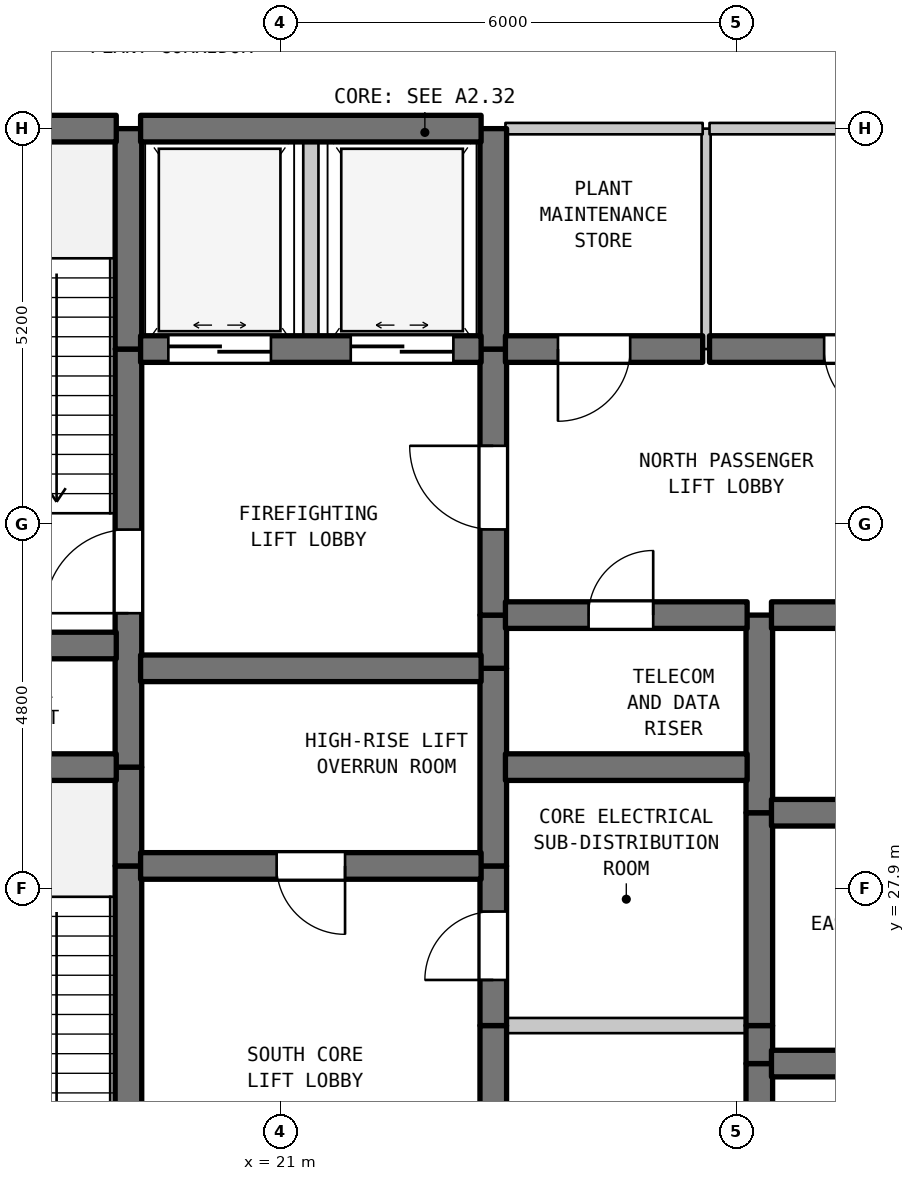
"""IFC4 building model, lengths in metres.
Left out: names, types, materials, properties, quantities, classifications, styles, units other than length and angle.
Written with IfcOpenShell. Run it as: python <this file> out.ifc"""

import sys

from ifc_helpers import new_model, si_unit, direction, frame, frame_2d, origin, place, context, subcontext, project, spatial, rectangle, extrude, element, fill, save


model = new_model("IFC4")
c1 = context("Model", 3, precision=1e-05, world=origin(), true_north=direction((0.0, 1.0)))
c2 = subcontext(c1, "Body", "Model", "MODEL_VIEW")
j1 = project(units=[si_unit("LENGTHUNIT", "METRE"), si_unit("PLANEANGLEUNIT", "RADIAN")], contexts=[c1])
p1 = place(None, origin())
s1 = spatial("IfcSite", under=j1, at=p1, CompositionType="ELEMENT")
p2 = place(p1, origin())
s2 = spatial("IfcBuilding", under=s1, at=p2, CompositionType="ELEMENT")
p3 = place(p2, frame((0.0, 0.0, 314.7)))
s3 = spatial("IfcBuildingStorey", under=s2, at=p3, CompositionType="ELEMENT", Elevation=314.7)
p4 = place(p3, frame((19.0, 22.7, 0.0), z_axis=(0.0, 0.0, 1.0), x_axis=(0.0, 1.0, 0.0)))
e1 = element("IfcWall", 1, at=p4, inside=s3, PredefinedType="SHEAR", context=c2, shape_type="SweptSolid", body=[
    extrude(rectangle(XDim=5.5, YDim=0.35, at=frame_2d((2.75, 0.0))), origin(), (0.0, 0.0, 1.0), 4.99),
])
p5 = place(p4, frame((0.631, 0.0, 0.0)))
e2 = element("IfcOpeningElement", 2, at=p5, cuts=e1, PredefinedType="OPENING", context=c2, shape_type="SweptSolid", body=[
    extrude(rectangle(XDim=1.1, YDim=2.15, at=frame_2d((0.55, 1.075))), frame((0.0, 0.185, 0.0), z_axis=(0.0, -1.0, 0.0), x_axis=(1.0, 0.0, 0.0)), (0.0, 0.0, 1.0), 0.37),
])
p6 = place(p3, frame((19.0, 28.2, 0.0), z_axis=(0.0, 0.0, 1.0), x_axis=(0.0, 1.0, 0.0)))
e3 = element("IfcWall", 3, at=p6, inside=s3, PredefinedType="SHEAR", context=c2, shape_type="SweptSolid", body=[
    extrude(rectangle(XDim=1.3, YDim=0.35, at=frame_2d((0.65, 0.0))), origin(), (0.0, 0.0, 1.0), 4.99),
])
p7 = place(p3, frame((19.0, 29.5, 0.0), z_axis=(0.0, 0.0, 1.0), x_axis=(0.0, 1.0, 0.0)))
e4 = element("IfcWall", 4, at=p7, inside=s3, PredefinedType="SHEAR", context=c2, shape_type="SweptSolid", body=[
    extrude(rectangle(XDim=5.5, YDim=0.35, at=frame_2d((2.75, 0.0))), origin(), (0.0, 0.0, 1.0), 4.99),
])
p8 = place(p7, frame((2.025, 0.0, 0.0)))
e5 = element("IfcOpeningElement", 5, at=p8, cuts=e4, PredefinedType="OPENING", context=c2, shape_type="SweptSolid", body=[
    extrude(rectangle(XDim=1.1, YDim=2.15, at=frame_2d((0.55, 1.075))), frame((0.0, 0.185, 0.0), z_axis=(0.0, -1.0, 0.0), x_axis=(1.0, 0.0, 0.0)), (0.0, 0.0, 1.0), 0.37),
])
p9 = place(p3, frame((19.0, 35.0, 0.0), z_axis=(0.0, 0.0, 1.0), x_axis=(0.0, 1.0, 0.0)))
e6 = element("IfcWall", 6, at=p9, inside=s3, PredefinedType="SHEAR", context=c2, shape_type="SweptSolid", body=[
    extrude(rectangle(XDim=2.9, YDim=0.35, at=frame_2d((1.45, 0.0))), origin(), (0.0, 0.0, 1.0), 4.99),
])
p10 = place(p3, frame((21.4, 35.0, 0.0), z_axis=(0.0, 0.0, 1.0), x_axis=(0.0, 1.0, 0.0)))
e7 = element("IfcWall", 7, at=p10, inside=s3, PredefinedType="STANDARD", context=c2, shape_type="SweptSolid", body=[
    extrude(rectangle(XDim=2.9, YDim=0.2, at=frame_2d((1.45, 0.0))), origin(), (0.0, 0.0, 1.0), 4.99),
])
p11 = place(p3, frame((23.8, 22.7, 0.0), z_axis=(0.0, 0.0, 1.0), x_axis=(0.0, 1.0, 0.0)))
e8 = element("IfcWall", 8, at=p11, inside=s3, PredefinedType="SHEAR", context=c2, shape_type="SweptSolid", body=[
    extrude(rectangle(XDim=3.4, YDim=0.35, at=frame_2d((1.7, 0.0))), origin(), (0.0, 0.0, 1.0), 4.99),
])
p12 = place(p11, frame((1.25, 0.0, 0.0)))
e9 = element("IfcOpeningElement", 9, at=p12, cuts=e8, PredefinedType="OPENING", context=c2, shape_type="SweptSolid", body=[
    extrude(rectangle(XDim=0.9, YDim=2.15, at=frame_2d((0.45, 1.075))), frame((0.0, 0.185, 0.0), z_axis=(0.0, -1.0, 0.0), x_axis=(1.0, 0.0, 0.0)), (0.0, 0.0, 1.0), 0.37),
])
p13 = place(p3, frame((23.8, 26.1, 0.0), z_axis=(0.0, 0.0, 1.0), x_axis=(0.0, 1.0, 0.0)))
e10 = element("IfcWall", 10, at=p13, inside=s3, PredefinedType="SHEAR", context=c2, shape_type="SweptSolid", body=[
    extrude(rectangle(XDim=2.1, YDim=0.35, at=frame_2d((1.05, 0.0))), origin(), (0.0, 0.0, 1.0), 4.99),
])
p14 = place(p13, frame((0.6, 0.0, 0.0)))
e11 = element("IfcOpeningElement", 11, at=p14, cuts=e10, PredefinedType="OPENING", context=c2, shape_type="SweptSolid", body=[
    extrude(rectangle(XDim=0.9, YDim=2.15, at=frame_2d((0.45, 1.075))), frame((0.0, 0.185, 0.0), z_axis=(0.0, -1.0, 0.0), x_axis=(1.0, 0.0, 0.0)), (0.0, 0.0, 1.0), 0.37),
])
p15 = place(p3, frame((23.8, 28.2, 0.0), z_axis=(0.0, 0.0, 1.0), x_axis=(0.0, 1.0, 0.0)))
e12 = element("IfcWall", 12, at=p15, inside=s3, PredefinedType="SHEAR", context=c2, shape_type="SweptSolid", body=[
    extrude(rectangle(XDim=2.6, YDim=0.35, at=frame_2d((1.3, 0.0))), origin(), (0.0, 0.0, 1.0), 4.99),
])
p16 = place(p3, frame((23.8, 30.8, 0.0), z_axis=(0.0, 0.0, 1.0), x_axis=(0.0, 1.0, 0.0)))
e13 = element("IfcWall", 13, at=p16, inside=s3, PredefinedType="SHEAR", context=c2, shape_type="SweptSolid", body=[
    extrude(rectangle(XDim=0.7, YDim=0.35, at=frame_2d((0.35, 0.0))), origin(), (0.0, 0.0, 1.0), 4.99),
])
p17 = place(p3, frame((23.8, 31.5, 0.0), z_axis=(0.0, 0.0, 1.0), x_axis=(0.0, 1.0, 0.0)))
e14 = element("IfcWall", 14, at=p17, inside=s3, PredefinedType="SHEAR", context=c2, shape_type="SweptSolid", body=[
    extrude(rectangle(XDim=3.5, YDim=0.35, at=frame_2d((1.75, 0.0))), origin(), (0.0, 0.0, 1.0), 4.99),
])
p18 = place(p17, frame((1.127, 0.0, 0.0)))
e15 = element("IfcOpeningElement", 15, at=p18, cuts=e14, PredefinedType="OPENING", context=c2, shape_type="SweptSolid", body=[
    extrude(rectangle(XDim=1.1, YDim=2.15, at=frame_2d((0.55, 1.075))), frame((0.0, 0.185, 0.0), z_axis=(0.0, -1.0, 0.0), x_axis=(1.0, 0.0, 0.0)), (0.0, 0.0, 1.0), 0.37),
])
p19 = place(p3, frame((23.8, 35.0, 0.0), z_axis=(0.0, 0.0, 1.0), x_axis=(0.0, 1.0, 0.0)))
e16 = element("IfcWall", 16, at=p19, inside=s3, PredefinedType="SHEAR", context=c2, shape_type="SweptSolid", body=[
    extrude(rectangle(XDim=2.9, YDim=0.35, at=frame_2d((1.45, 0.0))), origin(), (0.0, 0.0, 1.0), 4.99),
])
p20 = place(p3, frame((26.6, 35.0, 0.0), z_axis=(0.0, 0.0, 1.0), x_axis=(0.0, 1.0, 0.0)))
e17 = element("IfcWall", 17, at=p20, inside=s3, PredefinedType="PARTITIONING", context=c2, shape_type="SweptSolid", body=[
    extrude(rectangle(XDim=2.9, YDim=0.12, at=frame_2d((1.45, 0.0))), origin(), (0.0, 0.0, 1.0), 4.99),
])
p21 = place(p3, frame((27.3, 22.7, 0.0), z_axis=(0.0, 0.0, 1.0), x_axis=(0.0, 1.0, 0.0)))
e18 = element("IfcWall", 18, at=p21, inside=s3, PredefinedType="SHEAR", context=c2, shape_type="SweptSolid", body=[
    extrude(rectangle(XDim=2.9, YDim=0.35, at=frame_2d((1.45, 0.0))), origin(), (0.0, 0.0, 1.0), 4.99),
])
p22 = place(p3, frame((27.3, 25.6, 0.0), z_axis=(0.0, 0.0, 1.0), x_axis=(0.0, 1.0, 0.0)))
e19 = element("IfcWall", 19, at=p22, inside=s3, PredefinedType="SHEAR", context=c2, shape_type="SweptSolid", body=[
    extrude(rectangle(XDim=0.5, YDim=0.35, at=frame_2d((0.25, 0.0))), origin(), (0.0, 0.0, 1.0), 4.99),
])
p23 = place(p3, frame((27.3, 26.1, 0.0), z_axis=(0.0, 0.0, 1.0), x_axis=(0.0, 1.0, 0.0)))
e20 = element("IfcWall", 20, at=p23, inside=s3, PredefinedType="SHEAR", context=c2, shape_type="SweptSolid", body=[
    extrude(rectangle(XDim=2.8, YDim=0.35, at=frame_2d((1.4, 0.0))), origin(), (0.0, 0.0, 1.0), 4.99),
])
p24 = place(p3, frame((27.3, 28.9, 0.0), z_axis=(0.0, 0.0, 1.0), x_axis=(0.0, 1.0, 0.0)))
e21 = element("IfcWall", 21, at=p24, inside=s3, PredefinedType="SHEAR", context=c2, shape_type="SweptSolid", body=[
    extrude(rectangle(XDim=2.6, YDim=0.35, at=frame_2d((1.3, 0.0))), origin(), (0.0, 0.0, 1.0), 4.99),
])
p25 = place(p3, frame((27.46, 25.6, 0.0), z_axis=(0.0, 0.0, 1.0), x_axis=(1.0, 0.0, 0.0)))
e22 = element("IfcWall", 22, at=p25, inside=s3, PredefinedType="SHEAR", context=c2, shape_type="SweptSolid", body=[
    extrude(rectangle(XDim=3.18, YDim=0.35, at=frame_2d((1.59, 0.0))), origin(), (0.0, 0.0, 1.0), 4.99),
])
p26 = place(p25, frame((1.115, 0.0, 0.0)))
e23 = element("IfcOpeningElement", 23, at=p26, cuts=e22, PredefinedType="OPENING", context=c2, shape_type="SweptSolid", body=[
    extrude(rectangle(XDim=0.95, YDim=2.15, at=frame_2d((0.475, 1.075))), frame((0.0, 0.185, 0.0), z_axis=(0.0, -1.0, 0.0), x_axis=(1.0, 0.0, 0.0)), (0.0, 0.0, 1.0), 0.37),
])
p27 = place(p3, frame((23.96, 26.1, 0.0), z_axis=(0.0, 0.0, 1.0), x_axis=(1.0, 0.0, 0.0)))
e24 = element("IfcWall", 24, at=p27, inside=s3, PredefinedType="STANDARD", context=c2, shape_type="SweptSolid", body=[
    extrude(rectangle(XDim=3.18, YDim=0.2, at=frame_2d((1.59, 0.0))), origin(), (0.0, 0.0, 1.0), 4.99),
])
p28 = place(p3, frame((19.16, 28.2, 0.0), z_axis=(0.0, 0.0, 1.0), x_axis=(1.0, 0.0, 0.0)))
e25 = element("IfcWall", 25, at=p28, inside=s3, PredefinedType="SHEAR", context=c2, shape_type="SweptSolid", body=[
    extrude(rectangle(XDim=4.48, YDim=0.35, at=frame_2d((2.24, 0.0))), origin(), (0.0, 0.0, 1.0), 4.99),
])
p29 = place(p28, frame((1.79, 0.0, 0.0)))
e26 = element("IfcOpeningElement", 26, at=p29, cuts=e25, PredefinedType="OPENING", context=c2, shape_type="SweptSolid", body=[
    extrude(rectangle(XDim=0.9, YDim=2.15, at=frame_2d((0.45, 1.075))), frame((0.0, 0.185, 0.0), z_axis=(0.0, -1.0, 0.0), x_axis=(1.0, 0.0, 0.0)), (0.0, 0.0, 1.0), 0.37),
])
p30 = place(p3, frame((27.46, 28.9, 0.0), z_axis=(0.0, 0.0, 1.0), x_axis=(1.0, 0.0, 0.0)))
e27 = element("IfcWall", 27, at=p30, inside=s3, PredefinedType="SHEAR", context=c2, shape_type="SweptSolid", body=[
    extrude(rectangle(XDim=3.18, YDim=0.35, at=frame_2d((1.59, 0.0))), origin(), (0.0, 0.0, 1.0), 4.99),
])
p31 = place(p30, frame((1.115, 0.0, 0.0)))
e28 = element("IfcOpeningElement", 28, at=p31, cuts=e27, PredefinedType="OPENING", context=c2, shape_type="SweptSolid", body=[
    extrude(rectangle(XDim=0.95, YDim=2.15, at=frame_2d((0.475, 1.075))), frame((0.0, 0.185, 0.0), z_axis=(0.0, -1.0, 0.0), x_axis=(1.0, 0.0, 0.0)), (0.0, 0.0, 1.0), 0.37),
])
p32 = place(p3, frame((15.16, 29.5, 0.0), z_axis=(0.0, 0.0, 1.0), x_axis=(1.0, 0.0, 0.0)))
e29 = element("IfcWall", 29, at=p32, inside=s3, PredefinedType="SHEAR", context=c2, shape_type="SweptSolid", body=[
    extrude(rectangle(XDim=3.68, YDim=0.35, at=frame_2d((1.84, 0.0))), origin(), (0.0, 0.0, 1.0), 4.99),
])
p33 = place(p3, frame((23.96, 29.5, 0.0), z_axis=(0.0, 0.0, 1.0), x_axis=(1.0, 0.0, 0.0)))
e30 = element("IfcWall", 30, at=p33, inside=s3, PredefinedType="SHEAR", context=c2, shape_type="SweptSolid", body=[
    extrude(rectangle(XDim=3.18, YDim=0.35, at=frame_2d((1.59, 0.0))), origin(), (0.0, 0.0, 1.0), 4.99),
])
p34 = place(p3, frame((19.16, 30.8, 0.0), z_axis=(0.0, 0.0, 1.0), x_axis=(1.0, 0.0, 0.0)))
e31 = element("IfcWall", 31, at=p34, inside=s3, PredefinedType="SHEAR", context=c2, shape_type="SweptSolid", body=[
    extrude(rectangle(XDim=4.48, YDim=0.35, at=frame_2d((2.24, 0.0))), origin(), (0.0, 0.0, 1.0), 4.99),
])
p35 = place(p3, frame((15.16, 31.1, 0.0), z_axis=(0.0, 0.0, 1.0), x_axis=(1.0, 0.0, 0.0)))
e32 = element("IfcWall", 32, at=p35, inside=s3, PredefinedType="SHEAR", context=c2, shape_type="SweptSolid", body=[
    extrude(rectangle(XDim=3.68, YDim=0.35, at=frame_2d((1.84, 0.0))), origin(), (0.0, 0.0, 1.0), 4.99),
])
p36 = place(p3, frame((23.96, 31.5, 0.0), z_axis=(0.0, 0.0, 1.0), x_axis=(1.0, 0.0, 0.0)))
e33 = element("IfcWall", 33, at=p36, inside=s3, PredefinedType="SHEAR", context=c2, shape_type="SweptSolid", body=[
    extrude(rectangle(XDim=3.18, YDim=0.35, at=frame_2d((1.59, 0.0))), origin(), (0.0, 0.0, 1.0), 4.99),
])
p37 = place(p36, frame((1.094, 0.0, 0.0)))
e34 = element("IfcOpeningElement", 34, at=p37, cuts=e33, PredefinedType="OPENING", context=c2, shape_type="SweptSolid", body=[
    extrude(rectangle(XDim=0.85, YDim=2.1, at=frame_2d((0.425, 1.05))), frame((0.0, 0.185, 0.0), z_axis=(0.0, -1.0, 0.0), x_axis=(1.0, 0.0, 0.0)), (0.0, 0.0, 1.0), 0.37),
])
p38 = place(p3, frame((27.46, 31.5, 0.0), z_axis=(0.0, 0.0, 1.0), x_axis=(1.0, 0.0, 0.0)))
e35 = element("IfcWall", 35, at=p38, inside=s3, PredefinedType="SHEAR", context=c2, shape_type="SweptSolid", body=[
    extrude(rectangle(XDim=3.18, YDim=0.35, at=frame_2d((1.59, 0.0))), origin(), (0.0, 0.0, 1.0), 4.99),
])
p39 = place(p3, frame((19.16, 35.0, 0.0), z_axis=(0.0, 0.0, 1.0), x_axis=(1.0, 0.0, 0.0)))
e36 = element("IfcWall", 36, at=p39, inside=s3, PredefinedType="SHEAR", context=c2, shape_type="SweptSolid", body=[
    extrude(rectangle(XDim=4.48, YDim=0.35, at=frame_2d((2.24, 0.0))), origin(), (0.0, 0.0, 1.0), 4.99),
])
p40 = place(p39, frame((0.365, 0.0, 0.0)))
e37 = element("IfcOpeningElement", 37, at=p40, cuts=e36, PredefinedType="OPENING", context=c2, shape_type="SweptSolid", body=[
    extrude(rectangle(XDim=1.35, YDim=2.2, at=frame_2d((0.675, 1.1))), frame((0.0, 0.185, 0.0), z_axis=(0.0, -1.0, 0.0), x_axis=(1.0, 0.0, 0.0)), (0.0, 0.0, 1.0), 0.37),
])
p41 = place(p39, frame((2.765, 0.0, 0.0)))
e38 = element("IfcOpeningElement", 38, at=p41, cuts=e36, PredefinedType="OPENING", context=c2, shape_type="SweptSolid", body=[
    extrude(rectangle(XDim=1.35, YDim=2.2, at=frame_2d((0.675, 1.1))), frame((0.0, 0.185, 0.0), z_axis=(0.0, -1.0, 0.0), x_axis=(1.0, 0.0, 0.0)), (0.0, 0.0, 1.0), 0.37),
])
p42 = place(p3, frame((23.96, 35.0, 0.0), z_axis=(0.0, 0.0, 1.0), x_axis=(1.0, 0.0, 0.0)))
e39 = element("IfcWall", 39, at=p42, inside=s3, PredefinedType="SHEAR", context=c2, shape_type="SweptSolid", body=[
    extrude(rectangle(XDim=2.595, YDim=0.35, at=frame_2d((1.297, 0.0))), origin(), (0.0, 0.0, 1.0), 4.99),
])
p43 = place(p42, frame((0.691, 0.0, 0.0)))
e40 = element("IfcOpeningElement", 40, at=p43, cuts=e39, PredefinedType="OPENING", context=c2, shape_type="SweptSolid", body=[
    extrude(rectangle(XDim=0.95, YDim=2.15, at=frame_2d((0.475, 1.075))), frame((0.0, 0.185, 0.0), z_axis=(0.0, -1.0, 0.0), x_axis=(1.0, 0.0, 0.0)), (0.0, 0.0, 1.0), 0.37),
])
p44 = place(p3, frame((26.645, 35.0, 0.0), z_axis=(0.0, 0.0, 1.0), x_axis=(1.0, 0.0, 0.0)))
e41 = element("IfcWall", 41, at=p44, inside=s3, PredefinedType="SHEAR", context=c2, shape_type="SweptSolid", body=[
    extrude(rectangle(XDim=3.995, YDim=0.35, at=frame_2d((1.998, 0.0))), origin(), (0.0, 0.0, 1.0), 4.99),
])
p45 = place(p44, frame((1.508, 0.0, 0.0)))
e42 = element("IfcOpeningElement", 42, at=p45, cuts=e41, PredefinedType="OPENING", context=c2, shape_type="SweptSolid", body=[
    extrude(rectangle(XDim=0.95, YDim=2.15, at=frame_2d((0.475, 1.075))), frame((0.0, 0.185, 0.0), z_axis=(0.0, -1.0, 0.0), x_axis=(1.0, 0.0, 0.0)), (0.0, 0.0, 1.0), 0.37),
])
p46 = place(p3, frame((15.16, 37.9, 0.0), z_axis=(0.0, 0.0, 1.0), x_axis=(1.0, 0.0, 0.0)))
e43 = element("IfcWall", 43, at=p46, inside=s3, PredefinedType="SHEAR", context=c2, shape_type="SweptSolid", body=[
    extrude(rectangle(XDim=3.68, YDim=0.35, at=frame_2d((1.84, 0.0))), origin(), (0.0, 0.0, 1.0), 4.99),
])
p47 = place(p3, frame((19.16, 37.9, 0.0), z_axis=(0.0, 0.0, 1.0), x_axis=(1.0, 0.0, 0.0)))
e44 = element("IfcWall", 44, at=p47, inside=s3, PredefinedType="SHEAR", context=c2, shape_type="SweptSolid", body=[
    extrude(rectangle(XDim=4.48, YDim=0.35, at=frame_2d((2.24, 0.0))), origin(), (0.0, 0.0, 1.0), 4.99),
])
p48 = place(p3, frame((23.96, 37.9, 0.0), z_axis=(0.0, 0.0, 1.0), x_axis=(1.0, 0.0, 0.0)))
e45 = element("IfcWall", 45, at=p48, inside=s3, PredefinedType="STANDARD", context=c2, shape_type="SweptSolid", body=[
    extrude(rectangle(XDim=2.595, YDim=0.15, at=frame_2d((1.297, 0.0))), origin(), (0.0, 0.0, 1.0), 4.49),
])
p49 = place(p3, frame((26.645, 37.9, 0.0), z_axis=(0.0, 0.0, 1.0), x_axis=(1.0, 0.0, 0.0)))
e46 = element("IfcWall", 46, at=p49, inside=s3, PredefinedType="STANDARD", context=c2, shape_type="SweptSolid", body=[
    extrude(rectangle(XDim=4.095, YDim=0.15, at=frame_2d((2.047, 0.0))), origin(), (0.0, 0.0, 1.0), 4.49),
])
p50 = place(p8, origin())
e47 = element("IfcDoor", 47, at=p50, inside=s3, OperationType="SINGLE_SWING_LEFT", PredefinedType="DOOR", context=c2, shape_type="SweptSolid", body=[
    extrude(rectangle(XDim=1.1, YDim=2.15, at=frame_2d((0.55, 1.075))), frame((0.0, 0.025, 0.0), z_axis=(0.0, -1.0, 0.0), x_axis=(1.0, 0.0, 0.0)), (0.0, 0.0, 1.0), 0.05),
])
fill(e5, e47)
p51 = place(p14, origin())
e48 = element("IfcDoor", 48, at=p51, inside=s3, OperationType="SINGLE_SWING_LEFT", PredefinedType="DOOR", context=c2, shape_type="SweptSolid", body=[
    extrude(rectangle(XDim=0.9, YDim=2.15, at=frame_2d((0.45, 1.075))), frame((0.0, 0.025, 0.0), z_axis=(0.0, -1.0, 0.0), x_axis=(1.0, 0.0, 0.0)), (0.0, 0.0, 1.0), 0.05),
])
fill(e11, e48)
p52 = place(p18, origin())
e49 = element("IfcDoor", 49, at=p52, inside=s3, OperationType="SINGLE_SWING_RIGHT", PredefinedType="DOOR", context=c2, shape_type="SweptSolid", body=[
    extrude(rectangle(XDim=1.1, YDim=2.15, at=frame_2d((0.55, 1.075))), frame((0.0, 0.025, 0.0), z_axis=(0.0, -1.0, 0.0), x_axis=(1.0, 0.0, 0.0)), (0.0, 0.0, 1.0), 0.05),
])
fill(e15, e49)
p53 = place(p29, frame((0.9, 0.0, 0.0), z_axis=(0.0, 0.0, 1.0), x_axis=(-1.0, 0.0, 0.0)))
e50 = element("IfcDoor", 50, at=p53, inside=s3, OperationType="SINGLE_SWING_RIGHT", PredefinedType="DOOR", context=c2, shape_type="SweptSolid", body=[
    extrude(rectangle(XDim=0.9, YDim=2.15, at=frame_2d((0.45, 1.075))), frame((0.0, 0.025, 0.0), z_axis=(0.0, -1.0, 0.0), x_axis=(1.0, 0.0, 0.0)), (0.0, 0.0, 1.0), 0.05),
])
fill(e26, e50)
p54 = place(p37, origin())
e51 = element("IfcDoor", 51, at=p54, inside=s3, OperationType="SINGLE_SWING_RIGHT", PredefinedType="DOOR", context=c2, shape_type="SweptSolid", body=[
    extrude(rectangle(XDim=0.85, YDim=2.1, at=frame_2d((0.425, 1.05))), frame((0.0, 0.025, 0.0), z_axis=(0.0, -1.0, 0.0), x_axis=(1.0, 0.0, 0.0)), (0.0, 0.0, 1.0), 0.05),
])
fill(e34, e51)
p55 = place(p40, origin())
e52 = element("IfcDoor", 52, at=p55, inside=s3, OperationType="DOUBLE_DOOR_SLIDING", PredefinedType="DOOR", context=c2, shape_type="SweptSolid", body=[
    extrude(rectangle(XDim=1.35, YDim=2.2, at=frame_2d((0.675, 1.1))), frame((0.0, 0.025, 0.0), z_axis=(0.0, -1.0, 0.0), x_axis=(1.0, 0.0, 0.0)), (0.0, 0.0, 1.0), 0.05),
])
fill(e37, e52)
p56 = place(p41, origin())
e53 = element("IfcDoor", 53, at=p56, inside=s3, OperationType="DOUBLE_DOOR_SLIDING", PredefinedType="DOOR", context=c2, shape_type="SweptSolid", body=[
    extrude(rectangle(XDim=1.35, YDim=2.2, at=frame_2d((0.675, 1.1))), frame((0.0, 0.025, 0.0), z_axis=(0.0, -1.0, 0.0), x_axis=(1.0, 0.0, 0.0)), (0.0, 0.0, 1.0), 0.05),
])
fill(e38, e53)
p57 = place(p43, frame((0.95, 0.0, 0.0), z_axis=(0.0, 0.0, 1.0), x_axis=(-1.0, 0.0, 0.0)))
e54 = element("IfcDoor", 54, at=p57, inside=s3, OperationType="SINGLE_SWING_LEFT", PredefinedType="DOOR", context=c2, shape_type="SweptSolid", body=[
    extrude(rectangle(XDim=0.95, YDim=2.15, at=frame_2d((0.475, 1.075))), frame((0.0, 0.025, 0.0), z_axis=(0.0, -1.0, 0.0), x_axis=(1.0, 0.0, 0.0)), (0.0, 0.0, 1.0), 0.05),
])
fill(e40, e54)
p58 = place(p45, frame((0.95, 0.0, 0.0), z_axis=(0.0, 0.0, 1.0), x_axis=(-1.0, 0.0, 0.0)))
e55 = element("IfcDoor", 55, at=p58, inside=s3, OperationType="SINGLE_SWING_RIGHT", PredefinedType="DOOR", context=c2, shape_type="SweptSolid", body=[
    extrude(rectangle(XDim=0.95, YDim=2.15, at=frame_2d((0.475, 1.075))), frame((0.0, 0.025, 0.0), z_axis=(0.0, -1.0, 0.0), x_axis=(1.0, 0.0, 0.0)), (0.0, 0.0, 1.0), 0.05),
])
fill(e42, e55)
save(model, sys.argv[1])
